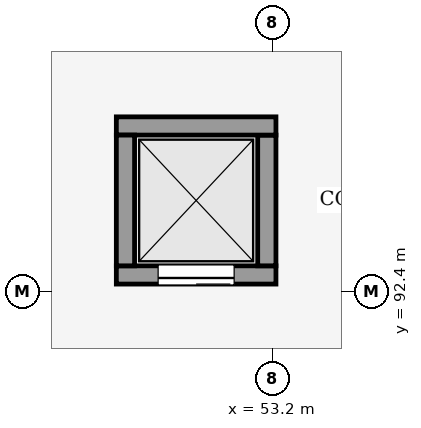
"""IFC4 building model, lengths in metres.
Left out: names, types, materials, properties, quantities, classifications, styles, units other than length and angle.
Written with IfcOpenShell. Run it as: python <this file> out.ifc"""

import sys

from ifc_helpers import new_model, si_unit, direction, frame, frame_2d, origin, place, context, subcontext, project, spatial, rectangle, extrude, element, fill, save


model = new_model("IFC4")
c1 = context("Model", 3, precision=1e-05, world=origin(), true_north=direction((0.0, 1.0)))
c2 = subcontext(c1, "Body", "Model", "MODEL_VIEW")
j1 = project(units=[si_unit("LENGTHUNIT", "METRE"), si_unit("PLANEANGLEUNIT", "RADIAN")], contexts=[c1])
p1 = place(None, origin())
s1 = spatial("IfcSite", under=j1, at=p1, CompositionType="ELEMENT")
p2 = place(p1, origin())
s2 = spatial("IfcBuilding", under=s1, at=p2, CompositionType="ELEMENT")
p3 = place(p2, origin())
s3 = spatial("IfcBuildingStorey", under=s2, at=p3, CompositionType="ELEMENT", Elevation=0.0)
p4 = place(p3, frame((53.25, 92.62, 0.0), z_axis=(0.0, 0.0, 1.0), x_axis=(-1.0, 0.0, 0.0)))
e1 = element("IfcWall", 1, at=p4, inside=s3, PredefinedType="SHEAR", context=c2, shape_type="SweptSolid", body=[
    extrude(rectangle(XDim=2.1, YDim=0.24, at=frame_2d((1.05, 0.0))), origin(), (0.0, 0.0, 1.0), 5.1),
])
p5 = place(p4, frame((0.55, 0.0, 0.0)))
e2 = element("IfcOpeningElement", 2, at=p5, cuts=e1, PredefinedType="OPENING", context=c2, shape_type="SweptSolid", body=[
    extrude(rectangle(XDim=1.0, YDim=2.15, at=frame_2d((0.5, 1.075))), frame((0.0, 0.13, 0.0), z_axis=(0.0, -1.0, 0.0), x_axis=(1.0, 0.0, 0.0)), (0.0, 0.0, 1.0), 0.26),
])
p6 = place(p3, frame((53.13, 94.46, 0.0), z_axis=(0.0, 0.0, 1.0), x_axis=(0.0, -1.0, 0.0)))
e3 = element("IfcWall", 3, at=p6, inside=s3, PredefinedType="SHEAR", context=c2, shape_type="SweptSolid", body=[
    extrude(rectangle(XDim=1.72, YDim=0.24, at=frame_2d((0.86, 0.0))), origin(), (0.0, 0.0, 1.0), 5.1),
])
p7 = place(p3, frame((51.15, 94.58, 0.0), z_axis=(0.0, 0.0, 1.0), x_axis=(1.0, 0.0, 0.0)))
e4 = element("IfcWall", 4, at=p7, inside=s3, PredefinedType="SHEAR", context=c2, shape_type="SweptSolid", body=[
    extrude(rectangle(XDim=2.1, YDim=0.24, at=frame_2d((1.05, 0.0))), origin(), (0.0, 0.0, 1.0), 5.1),
])
p8 = place(p3, frame((51.27, 92.74, 0.0), z_axis=(0.0, 0.0, 1.0), x_axis=(0.0, 1.0, 0.0)))
e5 = element("IfcWall", 5, at=p8, inside=s3, PredefinedType="SHEAR", context=c2, shape_type="SweptSolid", body=[
    extrude(rectangle(XDim=1.72, YDim=0.24, at=frame_2d((0.86, 0.0))), origin(), (0.0, 0.0, 1.0), 5.1),
])
p9 = place(p5, origin())
e6 = element("IfcDoor", 6, at=p9, inside=s3, OperationType="SLIDING_TO_LEFT", PredefinedType="DOOR", context=c2, shape_type="SweptSolid", body=[
    extrude(rectangle(XDim=1.0, YDim=2.15, at=frame_2d((0.5, 1.075))), frame((0.0, 0.025, 0.0), z_axis=(0.0, -1.0, 0.0), x_axis=(1.0, 0.0, 0.0)), (0.0, 0.0, 1.0), 0.05),
])
fill(e2, e6)
save(model, sys.argv[1])
